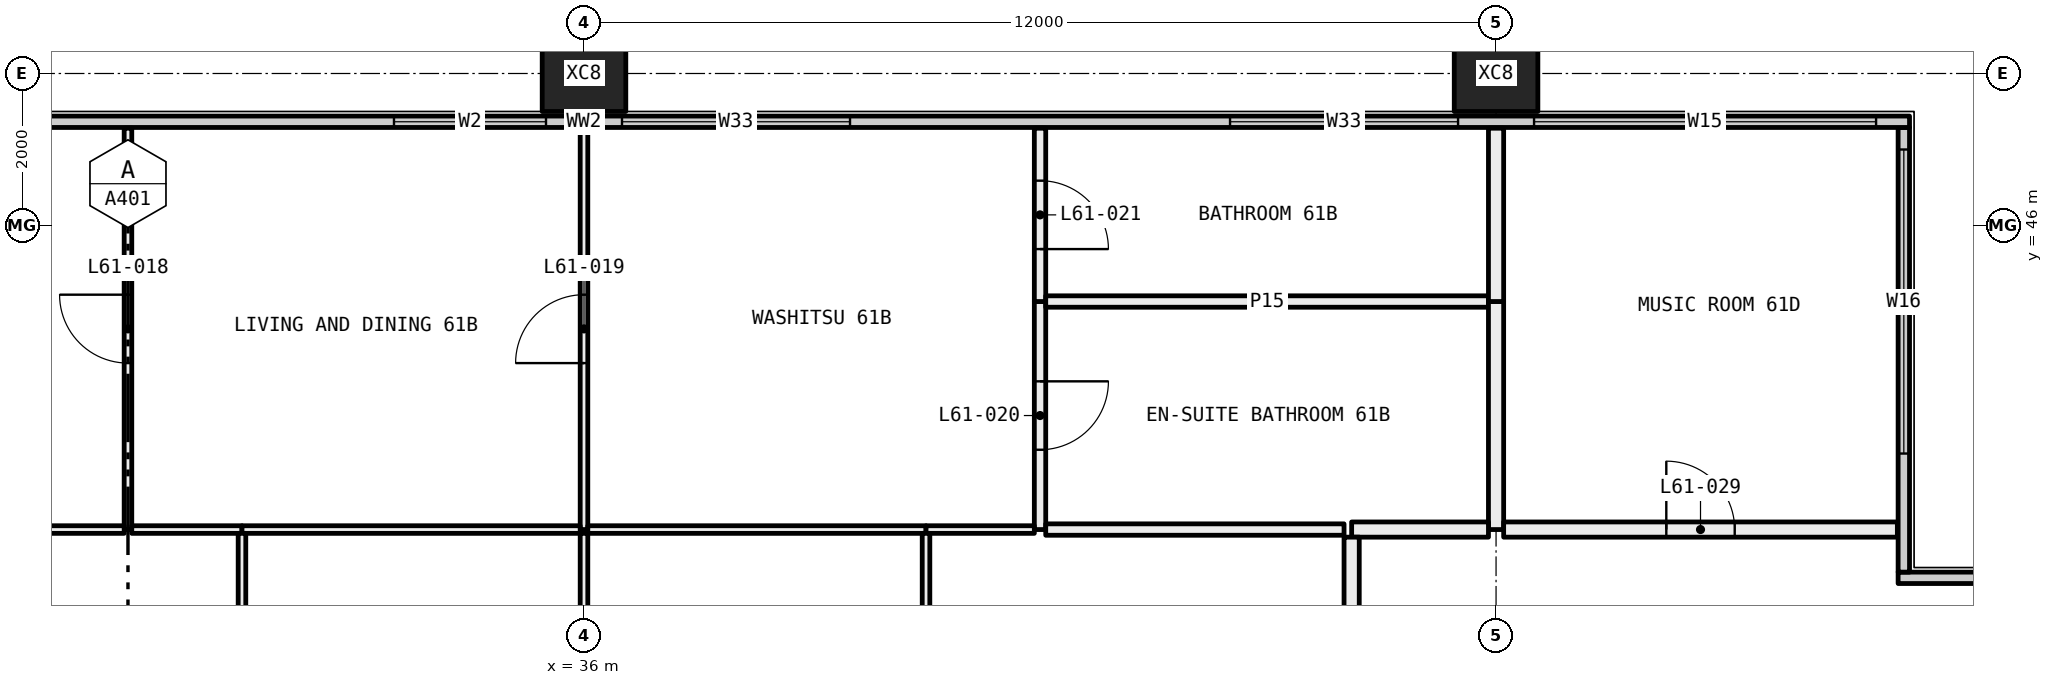
"""IFC4 building model, lengths in metres.
Left out: names, types, materials, properties, quantities, classifications, styles, units other than length and angle.
Written with IfcOpenShell. Run it as: python <this file> out.ifc"""

import sys

from ifc_helpers import new_model, si_unit, direction, frame, frame_2d, origin, origin_2d, place, context, subcontext, project, spatial, rectangle, hollow_rectangle, extrude, element, fill, save


model = new_model("IFC4")
c1 = context("Model", 3, precision=1e-05, world=origin(), true_north=direction((0.0, 1.0)))
c2 = subcontext(c1, "Body", "Model", "MODEL_VIEW")
j1 = project(units=[si_unit("LENGTHUNIT", "METRE"), si_unit("PLANEANGLEUNIT", "RADIAN")], contexts=[c1])
p1 = place(None, origin())
s1 = spatial("IfcSite", under=j1, at=p1, CompositionType="ELEMENT")
p2 = place(p1, origin())
s2 = spatial("IfcBuilding", under=s1, at=p2, CompositionType="ELEMENT")
p3 = place(p2, frame((0.0, 0.0, 228.3)))
s3 = spatial("IfcBuildingStorey", under=s2, at=p3, CompositionType="ELEMENT", Elevation=228.3)
for number, where, z_axis, x_axis in (
    (1, (36.0, 48.0, -0.4), (0.0, 0.0, 1.0), (1.0, 0.0, 0.0)),
    (2, (48.0, 48.0, -0.4), (0.0, 0.0, 1.0), (1.0, 0.0, 0.0)),
):
    element("IfcColumn", number, at=place(p3, frame(where, z_axis=z_axis, x_axis=x_axis)), inside=s3, PredefinedType="COLUMN", context=c2, shape_type="SweptSolid", body=[
        extrude(hollow_rectangle(XDim=1.1, YDim=1.0, WallThickness=0.04, at=origin_2d()), origin(), (0.0, 0.0, 1.0), 3.45),
    ])
p4 = place(p3, frame((53.29, 41.365, 0.0), z_axis=(0.0, 0.0, 1.0), x_axis=(1.0, 0.0, 0.0)))
e3 = element("IfcWall", 3, at=p4, inside=s3, PredefinedType="ELEMENTEDWALL", context=c2, shape_type="SweptSolid", body=[
    extrude(rectangle(XDim=6.15, YDim=0.15, at=frame_2d((3.075, 0.0))), origin(), (0.0, 0.0, 1.0), 3.05),
])
p5 = place(p4, frame((1.71, 0.0, 0.45)))
e4 = element("IfcOpeningElement", 4, at=p5, cuts=e3, PredefinedType="OPENING", context=c2, shape_type="SweptSolid", body=[
    extrude(rectangle(XDim=4.0, YDim=2.55, at=frame_2d((2.0, 1.275))), frame((0.0, 0.085, 0.0), z_axis=(0.0, -1.0, 0.0), x_axis=(1.0, 0.0, 0.0)), (0.0, 0.0, 1.0), 0.17),
])
p6 = place(p3, frame((53.365, 41.44, 0.0), z_axis=(0.0, 0.0, 1.0), x_axis=(0.0, 1.0, 0.0)))
e5 = element("IfcWall", 5, at=p6, inside=s3, PredefinedType="ELEMENTEDWALL", context=c2, shape_type="SweptSolid", body=[
    extrude(rectangle(XDim=5.85, YDim=0.15, at=frame_2d((2.925, 0.0))), origin(), (0.0, 0.0, 1.0), 3.05),
])
p7 = place(p6, frame((1.56, 0.0, 0.45)))
e6 = element("IfcOpeningElement", 6, at=p7, cuts=e5, PredefinedType="OPENING", context=c2, shape_type="SweptSolid", body=[
    extrude(rectangle(XDim=4.0, YDim=2.55, at=frame_2d((2.0, 1.275))), frame((0.0, 0.085, 0.0), z_axis=(0.0, -1.0, 0.0), x_axis=(1.0, 0.0, 0.0)), (0.0, 0.0, 1.0), 0.17),
])
p8 = place(p3, frame((18.56, 47.365, 0.0), z_axis=(0.0, 0.0, 1.0), x_axis=(1.0, 0.0, 0.0)))
e7 = element("IfcWall", 7, at=p8, inside=s3, PredefinedType="ELEMENTEDWALL", context=c2, shape_type="SweptSolid", body=[
    extrude(rectangle(XDim=34.88, YDim=0.15, at=frame_2d((17.44, 0.0))), origin(), (0.0, 0.0, 1.0), 3.05),
])
p9 = place(p8, frame((0.44, 0.0, 0.45)))
e8 = element("IfcOpeningElement", 8, at=p9, cuts=e7, PredefinedType="OPENING", context=c2, shape_type="SweptSolid", body=[
    extrude(rectangle(XDim=4.5, YDim=2.55, at=frame_2d((2.25, 1.275))), frame((0.0, 0.085, 0.0), z_axis=(0.0, -1.0, 0.0), x_axis=(1.0, 0.0, 0.0)), (0.0, 0.0, 1.0), 0.17),
])
p10 = place(p8, frame((5.94, 0.0, 0.45)))
e9 = element("IfcOpeningElement", 9, at=p10, cuts=e7, PredefinedType="OPENING", context=c2, shape_type="SweptSolid", body=[
    extrude(rectangle(XDim=3.0, YDim=2.55, at=frame_2d((1.5, 1.275))), frame((0.0, 0.085, 0.0), z_axis=(0.0, -1.0, 0.0), x_axis=(1.0, 0.0, 0.0)), (0.0, 0.0, 1.0), 0.17),
])
p11 = place(p8, frame((14.94, 0.0, 0.45)))
e10 = element("IfcOpeningElement", 10, at=p11, cuts=e7, PredefinedType="OPENING", context=c2, shape_type="SweptSolid", body=[
    extrude(rectangle(XDim=2.0, YDim=2.55, at=frame_2d((1.0, 1.275))), frame((0.0, 0.085, 0.0), z_axis=(0.0, -1.0, 0.0), x_axis=(1.0, 0.0, 0.0)), (0.0, 0.0, 1.0), 0.17),
])
p12 = place(p8, frame((17.94, 0.0, 0.45)))
e11 = element("IfcOpeningElement", 11, at=p12, cuts=e7, PredefinedType="OPENING", context=c2, shape_type="SweptSolid", body=[
    extrude(rectangle(XDim=3.0, YDim=2.55, at=frame_2d((1.5, 1.275))), frame((0.0, 0.085, 0.0), z_axis=(0.0, -1.0, 0.0), x_axis=(1.0, 0.0, 0.0)), (0.0, 0.0, 1.0), 0.17),
])
p13 = place(p8, frame((25.94, 0.0, 0.45)))
e12 = element("IfcOpeningElement", 12, at=p13, cuts=e7, PredefinedType="OPENING", context=c2, shape_type="SweptSolid", body=[
    extrude(rectangle(XDim=3.0, YDim=2.55, at=frame_2d((1.5, 1.275))), frame((0.0, 0.085, 0.0), z_axis=(0.0, -1.0, 0.0), x_axis=(1.0, 0.0, 0.0)), (0.0, 0.0, 1.0), 0.17),
])
p14 = place(p8, frame((29.94, 0.0, 0.45)))
e13 = element("IfcOpeningElement", 13, at=p14, cuts=e7, PredefinedType="OPENING", context=c2, shape_type="SweptSolid", body=[
    extrude(rectangle(XDim=4.5, YDim=2.55, at=frame_2d((2.25, 1.275))), frame((0.0, 0.085, 0.0), z_axis=(0.0, -1.0, 0.0), x_axis=(1.0, 0.0, 0.0)), (0.0, 0.0, 1.0), 0.17),
])
p15 = place(p3, frame((30.0, 42.0, 0.0), z_axis=(0.0, 0.0, 1.0), x_axis=(0.0, 1.0, 0.0)))
e14 = element("IfcWall", 14, at=p15, inside=s3, PredefinedType="PARTITIONING", context=c2, shape_type="SweptSolid", body=[
    extrude(rectangle(XDim=5.28, YDim=0.1, at=frame_2d((2.64, 0.0))), origin(), (0.0, 0.0, 1.0), 3.05),
])
p16 = place(p15, frame((2.19, 0.0, 0.0)))
e15 = element("IfcOpeningElement", 15, at=p16, cuts=e14, PredefinedType="OPENING", context=c2, shape_type="SweptSolid", body=[
    extrude(rectangle(XDim=0.9, YDim=2.1, at=frame_2d((0.45, 1.05))), frame((0.0, 0.06, 0.0), z_axis=(0.0, -1.0, 0.0), x_axis=(1.0, 0.0, 0.0)), (0.0, 0.0, 1.0), 0.12),
])
p17 = place(p3, frame((26.0, 42.0, 0.0), z_axis=(0.0, 0.0, 1.0), x_axis=(1.0, 0.0, 0.0)))
e16 = element("IfcWall", 16, at=p17, inside=s3, PredefinedType="PARTITIONING", context=c2, shape_type="SweptSolid", body=[
    extrude(rectangle(XDim=3.95, YDim=0.1, at=frame_2d((1.975, 0.0))), origin(), (0.0, 0.0, 1.0), 3.05),
])
p18 = place(p17, frame((1.525, 0.0, 0.0)))
e17 = element("IfcOpeningElement", 17, at=p18, cuts=e16, PredefinedType="OPENING", context=c2, shape_type="SweptSolid", body=[
    extrude(rectangle(XDim=0.9, YDim=2.1, at=frame_2d((0.45, 1.05))), frame((0.0, 0.06, 0.0), z_axis=(0.0, -1.0, 0.0), x_axis=(1.0, 0.0, 0.0)), (0.0, 0.0, 1.0), 0.12),
])
p19 = place(p3, frame((36.0, 42.0, 0.0), z_axis=(0.0, 0.0, 1.0), x_axis=(0.0, 1.0, 0.0)))
e18 = element("IfcWall", 18, at=p19, inside=s3, PredefinedType="PARTITIONING", context=c2, shape_type="SweptSolid", body=[
    extrude(rectangle(XDim=5.28, YDim=0.1, at=frame_2d((2.64, 0.0))), origin(), (0.0, 0.0, 1.0), 2.45),
])
p20 = place(p19, frame((2.19, 0.0, 0.0)))
e19 = element("IfcOpeningElement", 19, at=p20, cuts=e18, PredefinedType="OPENING", context=c2, shape_type="SweptSolid", body=[
    extrude(rectangle(XDim=0.9, YDim=2.1, at=frame_2d((0.45, 1.05))), frame((0.0, 0.06, 0.0), z_axis=(0.0, -1.0, 0.0), x_axis=(1.0, 0.0, 0.0)), (0.0, 0.0, 1.0), 0.12),
])
p21 = place(p3, frame((30.05, 42.0, 0.0), z_axis=(0.0, 0.0, 1.0), x_axis=(1.0, 0.0, 0.0)))
e20 = element("IfcWall", 20, at=p21, inside=s3, PredefinedType="PARTITIONING", context=c2, shape_type="SweptSolid", body=[
    extrude(rectangle(XDim=1.45, YDim=0.1, at=frame_2d((0.725, 0.0))), origin(), (0.0, 0.0, 1.0), 3.05),
])
p22 = place(p3, frame((31.5, 42.0, 0.0), z_axis=(0.0, 0.0, 1.0), x_axis=(1.0, 0.0, 0.0)))
e21 = element("IfcWall", 21, at=p22, inside=s3, PredefinedType="PARTITIONING", context=c2, shape_type="SweptSolid", body=[
    extrude(rectangle(XDim=4.45, YDim=0.1, at=frame_2d((2.225, 0.0))), origin(), (0.0, 0.0, 1.0), 2.45),
])
p23 = place(p3, frame((42.0, 42.0, 0.0), z_axis=(0.0, 0.0, 1.0), x_axis=(0.0, 1.0, 0.0)))
e22 = element("IfcWall", 22, at=p23, inside=s3, PredefinedType="PARTITIONING", context=c2, shape_type="SweptSolid", body=[
    extrude(rectangle(XDim=3.0, YDim=0.15, at=frame_2d((1.5, 0.0))), origin(), (0.0, 0.0, 1.0), 3.05),
])
p24 = place(p23, frame((1.05, 0.0, 0.0)))
e23 = element("IfcOpeningElement", 23, at=p24, cuts=e22, PredefinedType="OPENING", context=c2, shape_type="SweptSolid", body=[
    extrude(rectangle(XDim=0.9, YDim=2.1, at=frame_2d((0.45, 1.05))), frame((0.0, 0.085, 0.0), z_axis=(0.0, -1.0, 0.0), x_axis=(1.0, 0.0, 0.0)), (0.0, 0.0, 1.0), 0.17),
])
p25 = place(p3, frame((42.0, 45.0, 0.0), z_axis=(0.0, 0.0, 1.0), x_axis=(0.0, 1.0, 0.0)))
e24 = element("IfcWall", 24, at=p25, inside=s3, PredefinedType="PARTITIONING", context=c2, shape_type="SweptSolid", body=[
    extrude(rectangle(XDim=2.28, YDim=0.15, at=frame_2d((1.14, 0.0))), origin(), (0.0, 0.0, 1.0), 3.05),
])
p26 = place(p25, frame((0.69, 0.0, 0.0)))
e25 = element("IfcOpeningElement", 25, at=p26, cuts=e24, PredefinedType="OPENING", context=c2, shape_type="SweptSolid", body=[
    extrude(rectangle(XDim=0.9, YDim=2.1, at=frame_2d((0.45, 1.05))), frame((0.0, 0.085, 0.0), z_axis=(0.0, -1.0, 0.0), x_axis=(1.0, 0.0, 0.0)), (0.0, 0.0, 1.0), 0.17),
])
p27 = place(p3, frame((36.05, 42.0, 0.0), z_axis=(0.0, 0.0, 1.0), x_axis=(1.0, 0.0, 0.0)))
e26 = element("IfcWall", 26, at=p27, inside=s3, PredefinedType="PARTITIONING", context=c2, shape_type="SweptSolid", body=[
    extrude(rectangle(XDim=4.45, YDim=0.1, at=frame_2d((2.225, 0.0))), origin(), (0.0, 0.0, 1.0), 2.45),
])
p28 = place(p3, frame((40.5, 42.0, 0.0), z_axis=(0.0, 0.0, 1.0), x_axis=(1.0, 0.0, 0.0)))
e27 = element("IfcWall", 27, at=p28, inside=s3, PredefinedType="PARTITIONING", context=c2, shape_type="SweptSolid", body=[
    extrude(rectangle(XDim=1.425, YDim=0.1, at=frame_2d((0.712, 0.0))), origin(), (0.0, 0.0, 1.0), 3.05),
])
p29 = place(p3, frame((47.9, 45.0, 0.0), z_axis=(0.0, 0.0, 1.0), x_axis=(-1.0, 0.0, 0.0)))
e28 = element("IfcWall", 28, at=p29, inside=s3, PredefinedType="PARTITIONING", context=c2, shape_type="SweptSolid", body=[
    extrude(rectangle(XDim=5.825, YDim=0.15, at=frame_2d((2.913, 0.0))), origin(), (0.0, 0.0, 1.0), 3.05),
])
p30 = place(p3, frame((42.075, 42.0, 0.0), z_axis=(0.0, 0.0, 1.0), x_axis=(1.0, 0.0, 0.0)))
e29 = element("IfcWall", 29, at=p30, inside=s3, PredefinedType="PARTITIONING", context=c2, shape_type="SweptSolid", body=[
    extrude(rectangle(XDim=3.925, YDim=0.15, at=frame_2d((1.962, 0.0))), origin(), (0.0, 0.0, 1.0), 3.05),
])
p31 = place(p3, frame((48.0, 42.0, 0.0), z_axis=(0.0, 0.0, 1.0), x_axis=(0.0, 1.0, 0.0)))
e30 = element("IfcWall", 30, at=p31, inside=s3, PredefinedType="PARTITIONING", context=c2, shape_type="SweptSolid", body=[
    extrude(rectangle(XDim=3.0, YDim=0.2, at=frame_2d((1.5, 0.0))), origin(), (0.0, 0.0, 1.0), 3.05),
])
p32 = place(p3, frame((46.1, 42.0, 0.0), z_axis=(0.0, 0.0, 1.0), x_axis=(1.0, 0.0, 0.0)))
e31 = element("IfcWall", 31, at=p32, inside=s3, PredefinedType="PARTITIONING", context=c2, shape_type="SweptSolid", body=[
    extrude(rectangle(XDim=1.8, YDim=0.2, at=frame_2d((0.9, 0.0))), origin(), (0.0, 0.0, 1.0), 3.05),
])
p33 = place(p3, frame((48.0, 45.0, 0.0), z_axis=(0.0, 0.0, 1.0), x_axis=(0.0, 1.0, 0.0)))
e32 = element("IfcWall", 32, at=p33, inside=s3, PredefinedType="PARTITIONING", context=c2, shape_type="SweptSolid", body=[
    extrude(rectangle(XDim=2.28, YDim=0.2, at=frame_2d((1.14, 0.0))), origin(), (0.0, 0.0, 1.0), 3.05),
])
p34 = place(p3, frame((31.5, 36.1, 0.0), z_axis=(0.0, 0.0, 1.0), x_axis=(0.0, 1.0, 0.0)))
e33 = element("IfcWall", 33, at=p34, inside=s3, PredefinedType="PARTITIONING", context=c2, shape_type="SweptSolid", body=[
    extrude(rectangle(XDim=5.85, YDim=0.1, at=frame_2d((2.925, 0.0))), origin(), (0.0, 0.0, 1.0), 3.05),
])
p35 = place(p34, frame((2.475, 0.0, 0.0)))
e34 = element("IfcOpeningElement", 34, at=p35, cuts=e33, PredefinedType="OPENING", context=c2, shape_type="SweptSolid", body=[
    extrude(rectangle(XDim=0.9, YDim=2.1, at=frame_2d((0.45, 1.05))), frame((0.0, 0.06, 0.0), z_axis=(0.0, -1.0, 0.0), x_axis=(1.0, 0.0, 0.0)), (0.0, 0.0, 1.0), 0.12),
])
p36 = place(p3, frame((36.0, 36.55, 0.0), z_axis=(0.0, 0.0, 1.0), x_axis=(0.0, 1.0, 0.0)))
e35 = element("IfcWall", 35, at=p36, inside=s3, PredefinedType="PARTITIONING", context=c2, shape_type="SweptSolid", body=[
    extrude(rectangle(XDim=5.4, YDim=0.1, at=frame_2d((2.7, 0.0))), origin(), (0.0, 0.0, 1.0), 2.45),
])
p37 = place(p36, frame((2.25, 0.0, 0.0)))
e36 = element("IfcOpeningElement", 36, at=p37, cuts=e35, PredefinedType="OPENING", context=c2, shape_type="SweptSolid", body=[
    extrude(rectangle(XDim=0.9, YDim=2.1, at=frame_2d((0.45, 1.05))), frame((0.0, 0.06, 0.0), z_axis=(0.0, -1.0, 0.0), x_axis=(1.0, 0.0, 0.0)), (0.0, 0.0, 1.0), 0.12),
])
p38 = place(p3, frame((40.5, 36.1, 0.0), z_axis=(0.0, 0.0, 1.0), x_axis=(0.0, 1.0, 0.0)))
e37 = element("IfcWall", 37, at=p38, inside=s3, PredefinedType="PARTITIONING", context=c2, shape_type="SweptSolid", body=[
    extrude(rectangle(XDim=5.85, YDim=0.1, at=frame_2d((2.925, 0.0))), origin(), (0.0, 0.0, 1.0), 3.05),
])
p39 = place(p38, frame((2.475, 0.0, 0.0)))
e38 = element("IfcOpeningElement", 38, at=p39, cuts=e37, PredefinedType="OPENING", context=c2, shape_type="SweptSolid", body=[
    extrude(rectangle(XDim=0.9, YDim=2.1, at=frame_2d((0.45, 1.05))), frame((0.0, 0.06, 0.0), z_axis=(0.0, -1.0, 0.0), x_axis=(1.0, 0.0, 0.0)), (0.0, 0.0, 1.0), 0.12),
])
p40 = place(p3, frame((46.1, 36.1, 0.0), z_axis=(0.0, 0.0, 1.0), x_axis=(0.0, 1.0, 0.0)))
e39 = element("IfcWall", 39, at=p40, inside=s3, PredefinedType="PARTITIONING", context=c2, shape_type="SweptSolid", body=[
    extrude(rectangle(XDim=5.8, YDim=0.2, at=frame_2d((2.9, 0.0))), origin(), (0.0, 0.0, 1.0), 3.05),
])
p41 = place(p3, frame((48.1, 42.0, 0.0), z_axis=(0.0, 0.0, 1.0), x_axis=(1.0, 0.0, 0.0)))
e40 = element("IfcWall", 40, at=p41, inside=s3, PredefinedType="PARTITIONING", context=c2, shape_type="SweptSolid", body=[
    extrude(rectangle(XDim=5.18, YDim=0.2, at=frame_2d((2.59, 0.0))), origin(), (0.0, 0.0, 1.0), 3.05),
])
p42 = place(p41, frame((2.14, 0.0, 0.0)))
e41 = element("IfcOpeningElement", 41, at=p42, cuts=e40, PredefinedType="OPENING", context=c2, shape_type="SweptSolid", body=[
    extrude(rectangle(XDim=0.9, YDim=2.1, at=frame_2d((0.45, 1.05))), frame((0.0, 0.11, 0.0), z_axis=(0.0, -1.0, 0.0), x_axis=(1.0, 0.0, 0.0)), (0.0, 0.0, 1.0), 0.22),
])
p43 = place(p7, origin())
e42 = element("IfcWindow", 42, at=p43, inside=s3, PartitioningType="SINGLE_PANEL", PredefinedType="WINDOW", context=c2, shape_type="SweptSolid", body=[
    extrude(rectangle(XDim=4.0, YDim=2.55, at=frame_2d((2.0, 1.275))), frame((0.0, 0.03, 0.0), z_axis=(0.0, -1.0, 0.0), x_axis=(1.0, 0.0, 0.0)), (0.0, 0.0, 1.0), 0.06),
])
fill(e6, e42)
p44 = place(p11, origin())
e43 = element("IfcWindow", 43, at=p44, inside=s3, PartitioningType="SINGLE_PANEL", PredefinedType="WINDOW", context=c2, shape_type="SweptSolid", body=[
    extrude(rectangle(XDim=2.0, YDim=2.55, at=frame_2d((1.0, 1.275))), frame((0.0, 0.03, 0.0), z_axis=(0.0, -1.0, 0.0), x_axis=(1.0, 0.0, 0.0)), (0.0, 0.0, 1.0), 0.06),
])
fill(e10, e43)
p45 = place(p12, origin())
e44 = element("IfcWindow", 44, at=p45, inside=s3, PartitioningType="SINGLE_PANEL", PredefinedType="WINDOW", context=c2, shape_type="SweptSolid", body=[
    extrude(rectangle(XDim=3.0, YDim=2.55, at=frame_2d((1.5, 1.275))), frame((0.0, 0.03, 0.0), z_axis=(0.0, -1.0, 0.0), x_axis=(1.0, 0.0, 0.0)), (0.0, 0.0, 1.0), 0.06),
])
fill(e11, e44)
p46 = place(p13, origin())
e45 = element("IfcWindow", 45, at=p46, inside=s3, PartitioningType="SINGLE_PANEL", PredefinedType="WINDOW", context=c2, shape_type="SweptSolid", body=[
    extrude(rectangle(XDim=3.0, YDim=2.55, at=frame_2d((1.5, 1.275))), frame((0.0, 0.03, 0.0), z_axis=(0.0, -1.0, 0.0), x_axis=(1.0, 0.0, 0.0)), (0.0, 0.0, 1.0), 0.06),
])
fill(e12, e45)
p47 = place(p14, origin())
e46 = element("IfcWindow", 46, at=p47, inside=s3, PartitioningType="SINGLE_PANEL", PredefinedType="WINDOW", context=c2, shape_type="SweptSolid", body=[
    extrude(rectangle(XDim=4.5, YDim=2.55, at=frame_2d((2.25, 1.275))), frame((0.0, 0.03, 0.0), z_axis=(0.0, -1.0, 0.0), x_axis=(1.0, 0.0, 0.0)), (0.0, 0.0, 1.0), 0.06),
])
fill(e13, e46)
p48 = place(p16, origin())
e47 = element("IfcDoor", 47, at=p48, inside=s3, OperationType="SINGLE_SWING_LEFT", PredefinedType="DOOR", context=c2, shape_type="SweptSolid", body=[
    extrude(rectangle(XDim=0.9, YDim=2.1, at=frame_2d((0.45, 1.05))), frame((0.0, 0.025, 0.0), z_axis=(0.0, -1.0, 0.0), x_axis=(1.0, 0.0, 0.0)), (0.0, 0.0, 1.0), 0.05),
])
fill(e15, e47)
p49 = place(p20, origin())
e48 = element("IfcDoor", 48, at=p49, inside=s3, OperationType="SINGLE_SWING_RIGHT", PredefinedType="DOOR", context=c2, shape_type="SweptSolid", body=[
    extrude(rectangle(XDim=0.9, YDim=2.1, at=frame_2d((0.45, 1.05))), frame((0.0, 0.025, 0.0), z_axis=(0.0, -1.0, 0.0), x_axis=(1.0, 0.0, 0.0)), (0.0, 0.0, 1.0), 0.05),
])
fill(e19, e48)
p50 = place(p24, frame((0.9, 0.0, 0.0), x_axis=(-1.0, 0.0, 0.0)))
e49 = element("IfcDoor", 49, at=p50, inside=s3, OperationType="SINGLE_SWING_RIGHT", PredefinedType="DOOR", context=c2, shape_type="SweptSolid", body=[
    extrude(rectangle(XDim=0.9, YDim=2.1, at=frame_2d((0.45, 1.05))), frame((0.0, 0.025, 0.0), z_axis=(0.0, -1.0, 0.0), x_axis=(1.0, 0.0, 0.0)), (0.0, 0.0, 1.0), 0.05),
])
fill(e23, e49)
p51 = place(p26, frame((0.9, 0.0, 0.0), x_axis=(-1.0, 0.0, 0.0)))
e50 = element("IfcDoor", 50, at=p51, inside=s3, OperationType="SINGLE_SWING_LEFT", PredefinedType="DOOR", context=c2, shape_type="SweptSolid", body=[
    extrude(rectangle(XDim=0.9, YDim=2.1, at=frame_2d((0.45, 1.05))), frame((0.0, 0.025, 0.0), z_axis=(0.0, -1.0, 0.0), x_axis=(1.0, 0.0, 0.0)), (0.0, 0.0, 1.0), 0.05),
])
fill(e25, e50)
p52 = place(p42, origin())
e51 = element("IfcDoor", 51, at=p52, inside=s3, OperationType="SINGLE_SWING_RIGHT", PredefinedType="DOOR", context=c2, shape_type="SweptSolid", body=[
    extrude(rectangle(XDim=0.9, YDim=2.1, at=frame_2d((0.45, 1.05))), frame((0.0, 0.025, 0.0), z_axis=(0.0, -1.0, 0.0), x_axis=(1.0, 0.0, 0.0)), (0.0, 0.0, 1.0), 0.05),
])
fill(e41, e51)
save(model, sys.argv[1])
